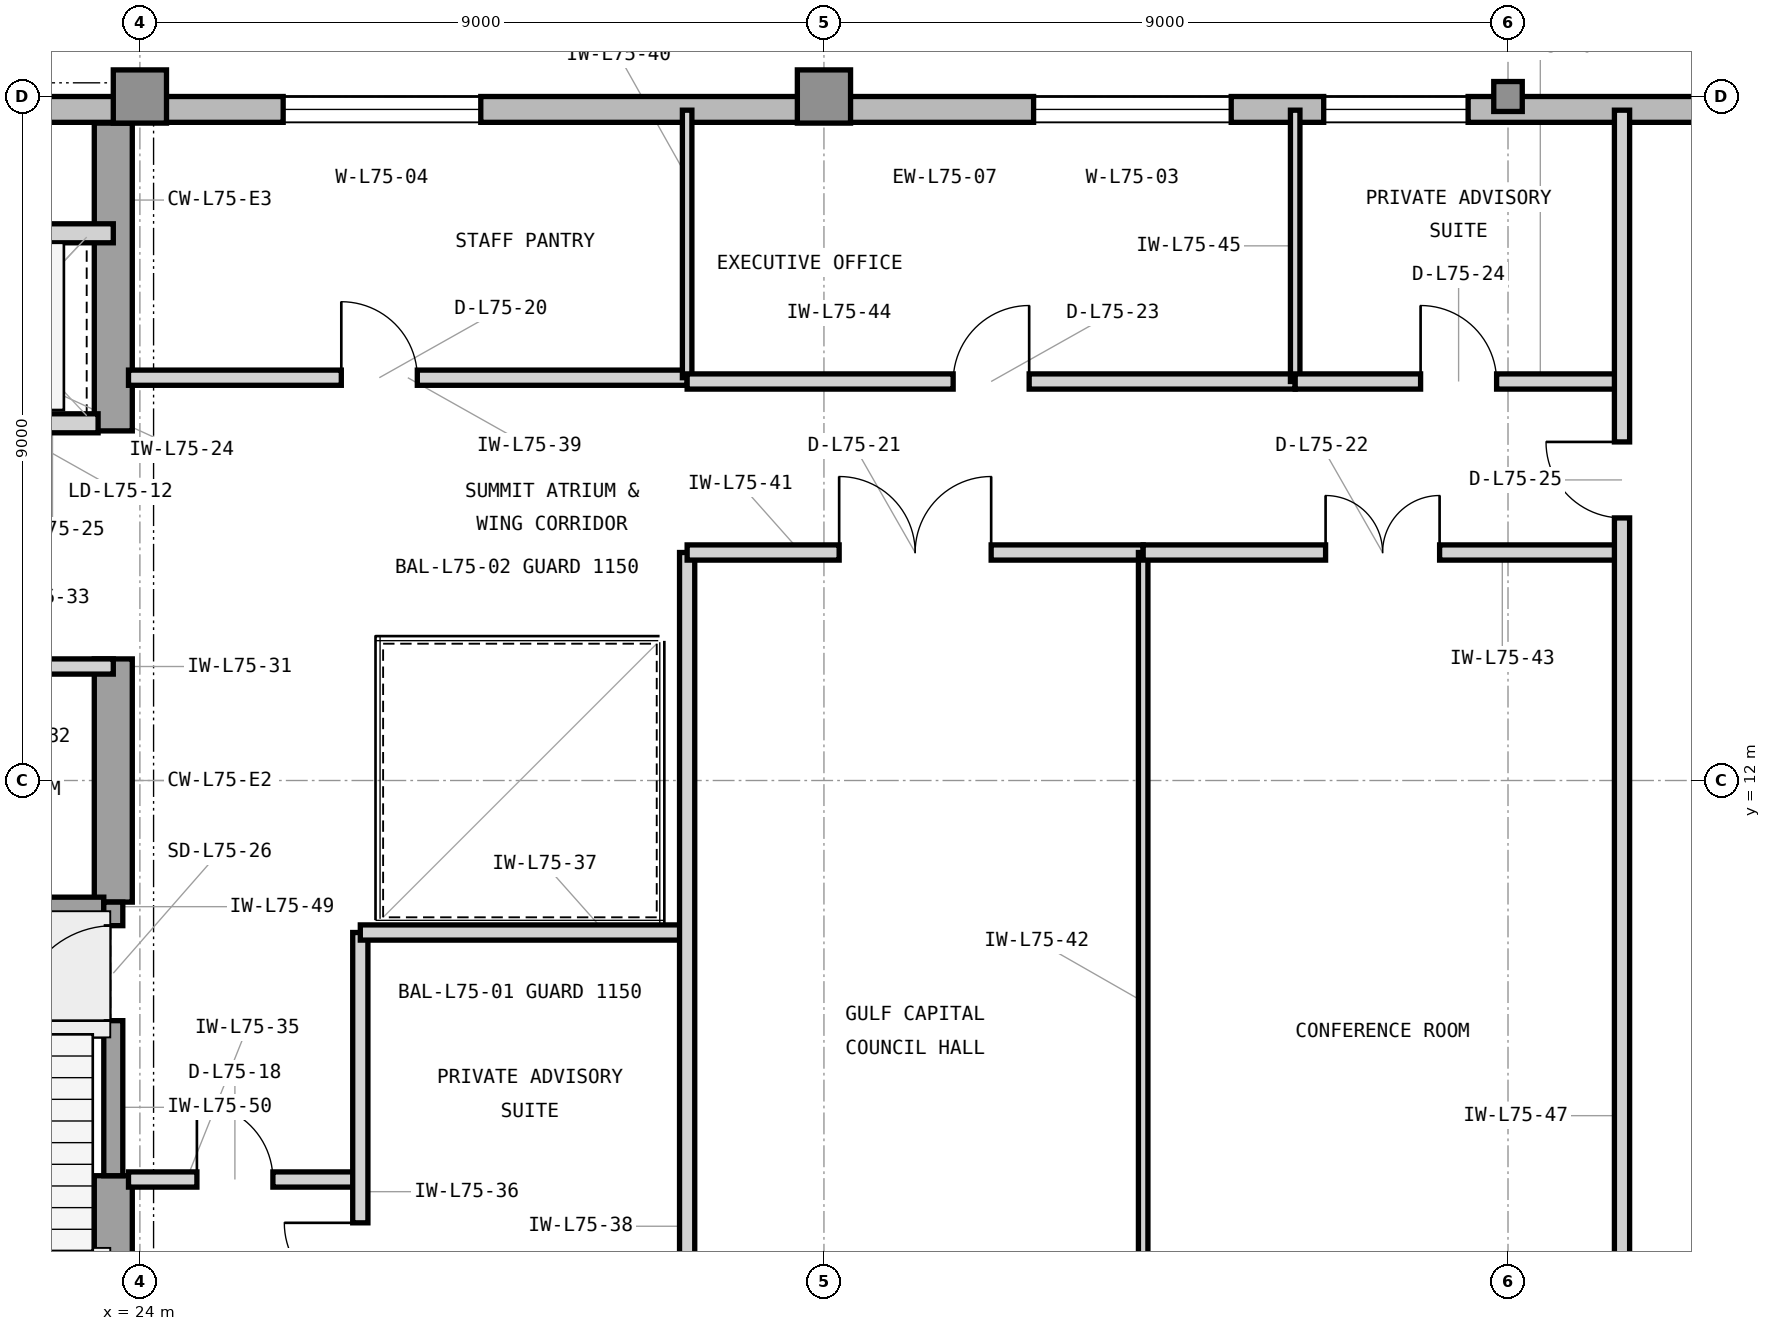
"""IFC4 building model, lengths in metres.
Left out: names, types, materials, properties, quantities, classifications, styles, units other than length and angle.
Written with IfcOpenShell. Run it as: python <this file> out.ifc"""

import sys

from ifc_helpers import new_model, si_unit, direction, frame, frame_2d, origin, origin_2d, place, context, subcontext, project, spatial, rectangle, i_section, extrude, element, fill, save


model = new_model("IFC4")
c1 = context("Model", 3, precision=1e-05, world=origin(), true_north=direction((0.0, 1.0)))
c2 = subcontext(c1, "Body", "Model", "MODEL_VIEW")
j1 = project(units=[si_unit("LENGTHUNIT", "METRE"), si_unit("PLANEANGLEUNIT", "RADIAN")], contexts=[c1])
p1 = place(None, origin())
s1 = spatial("IfcSite", under=j1, at=p1, CompositionType="ELEMENT")
p2 = place(p1, origin())
s2 = spatial("IfcBuilding", under=s1, at=p2, CompositionType="ELEMENT")
p3 = place(p2, frame((0.0, 0.0, 305.4)))
s3 = spatial("IfcBuildingStorey", under=s2, at=p3, CompositionType="ELEMENT", Elevation=305.4)
p4 = place(p3, frame((23.65, 3.6, 0.0), z_axis=(0.0, 0.0, 1.0), x_axis=(0.0, 1.0, 0.0)))
e1 = element("IfcWall", 1, at=p4, inside=s3, PredefinedType="SHEAR", context=c2, shape_type="SweptSolid", body=[
    extrude(rectangle(XDim=3.2, YDim=0.5, at=frame_2d((1.6, 0.0))), origin(), (0.0, 0.0, 1.0), 3.9),
])
p5 = place(p3, frame((23.65, 10.4, 0.0), z_axis=(0.0, 0.0, 1.0), x_axis=(0.0, 1.0, 0.0)))
e2 = element("IfcWall", 2, at=p5, inside=s3, PredefinedType="SHEAR", context=c2, shape_type="SweptSolid", body=[
    extrude(rectangle(XDim=3.2, YDim=0.5, at=frame_2d((1.6, 0.0))), origin(), (0.0, 0.0, 1.0), 3.9),
])
p6 = place(p3, frame((23.65, 16.6, 0.0), z_axis=(0.0, 0.0, 1.0), x_axis=(0.0, 1.0, 0.0)))
e3 = element("IfcWall", 3, at=p6, inside=s3, PredefinedType="SHEAR", context=c2, shape_type="SweptSolid", body=[
    extrude(rectangle(XDim=4.05, YDim=0.5, at=frame_2d((2.025, 0.0))), origin(), (0.0, 0.0, 1.0), 3.9),
])
for number, where, z_axis, x_axis in (
    (4, (24.0, 21.0, 0.0), (0.0, 0.0, 1.0), (1.0, 0.0, 0.0)),
    (5, (33.0, 21.0, 0.0), (0.0, 0.0, 1.0), (1.0, 0.0, 0.0)),
):
    element("IfcColumn", number, at=place(p3, frame(where, z_axis=z_axis, x_axis=x_axis)), inside=s3, PredefinedType="COLUMN", context=c2, shape_type="SweptSolid", body=[
        extrude(rectangle(XDim=0.7, YDim=0.7, at=origin_2d()), origin(), (0.0, 0.0, 1.0), 3.9),
    ])
p7 = place(p3, frame((42.0, 21.0, 0.0), z_axis=(0.0, 0.0, 1.0), x_axis=(1.0, 0.0, 0.0)))
e6 = element("IfcColumn", 6, at=p7, inside=s3, PredefinedType="COLUMN", context=c2, shape_type="SweptSolid", body=[
    extrude(i_section(OverallWidth=0.394, OverallDepth=0.375, WebThickness=0.017, FlangeThickness=0.028, FilletRadius=0.022, at=origin_2d()), origin(), (0.0, 0.0, 1.0), 3.9),
])
p8 = place(p3, frame((49.4, 20.83, 0.0), z_axis=(0.0, 0.0, 1.0), x_axis=(-1.0, 0.0, 0.0)))
e7 = element("IfcWall", 7, at=p8, inside=s3, PredefinedType="STANDARD", context=c2, shape_type="SweptSolid", body=[
    extrude(rectangle(XDim=29.62, YDim=0.34, at=frame_2d((14.81, 0.0))), origin(), (0.0, 0.0, 1.0), 3.715),
])
p9 = place(p8, frame((11.042, 0.0, 0.8)))
e8 = element("IfcOpeningElement", 8, at=p9, cuts=e7, PredefinedType="OPENING", context=c2, shape_type="SweptSolid", body=[
    extrude(rectangle(XDim=2.6, YDim=2.35, at=frame_2d((1.3, 1.175))), frame((0.0, 0.18, 0.0), z_axis=(0.0, -1.0, 0.0), x_axis=(1.0, 0.0, 0.0)), (0.0, 0.0, 1.0), 0.36),
])
p10 = place(p8, frame((20.915, 0.0, 0.8)))
e9 = element("IfcOpeningElement", 9, at=p10, cuts=e7, PredefinedType="OPENING", context=c2, shape_type="SweptSolid", body=[
    extrude(rectangle(XDim=2.6, YDim=2.35, at=frame_2d((1.3, 1.175))), frame((0.0, 0.18, 0.0), z_axis=(0.0, -1.0, 0.0), x_axis=(1.0, 0.0, 0.0)), (0.0, 0.0, 1.0), 0.36),
])
p11 = place(p8, frame((7.925, 0.0, 0.8)))
e10 = element("IfcOpeningElement", 10, at=p11, cuts=e7, PredefinedType="OPENING", context=c2, shape_type="SweptSolid", body=[
    extrude(rectangle(XDim=1.9, YDim=2.35, at=frame_2d((0.95, 1.175))), frame((0.0, 0.18, 0.0), z_axis=(0.0, -1.0, 0.0), x_axis=(1.0, 0.0, 0.0)), (0.0, 0.0, 1.0), 0.36),
])
p12 = place(p3, frame((21.05, 16.7, 0.0), z_axis=(0.0, 0.0, 1.0), x_axis=(1.0, 0.0, 0.0)))
e11 = element("IfcWall", 11, at=p12, inside=s3, PredefinedType="PARTITIONING", context=c2, shape_type="SweptSolid", body=[
    extrude(rectangle(XDim=2.4, YDim=0.25, at=frame_2d((1.2, 0.0))), origin(), (0.0, 0.0, 1.0), 3.354),
])
p13 = place(p12, frame((0.52, 0.0, 0.0)))
e12 = element("IfcOpeningElement", 12, at=p13, cuts=e11, PredefinedType="OPENING", context=c2, shape_type="SweptSolid", body=[
    extrude(rectangle(XDim=1.15, YDim=2.25, at=frame_2d((0.575, 1.125))), frame((0.0, 0.135, 0.0), z_axis=(0.0, -1.0, 0.0), x_axis=(1.0, 0.0, 0.0)), (0.0, 0.0, 1.0), 0.27),
])
p14 = place(p3, frame((16.45, 19.2, 0.0), z_axis=(0.0, 0.0, 1.0), x_axis=(1.0, 0.0, 0.0)))
e13 = element("IfcWall", 13, at=p14, inside=s3, PredefinedType="PARTITIONING", context=c2, shape_type="SweptSolid", body=[
    extrude(rectangle(XDim=7.2, YDim=0.25, at=frame_2d((3.6, 0.0))), origin(), (0.0, 0.0, 1.0), 3.705),
])
p15 = place(p3, frame((18.45, 13.5, 0.0), z_axis=(0.0, 0.0, 1.0), x_axis=(1.0, 0.0, 0.0)))
e14 = element("IfcWall", 14, at=p15, inside=s3, PredefinedType="PARTITIONING", context=c2, shape_type="SweptSolid", body=[
    extrude(rectangle(XDim=5.2, YDim=0.2, at=frame_2d((2.6, 0.0))), origin(), (0.0, 0.0, 1.0), 3.354),
])
p16 = place(p15, frame((2.125, 0.0, 0.0)))
e15 = element("IfcOpeningElement", 15, at=p16, cuts=e14, PredefinedType="OPENING", context=c2, shape_type="SweptSolid", body=[
    extrude(rectangle(XDim=0.95, YDim=2.1, at=frame_2d((0.475, 1.05))), frame((0.0, 0.11, 0.0), z_axis=(0.0, -1.0, 0.0), x_axis=(1.0, 0.0, 0.0)), (0.0, 0.0, 1.0), 0.22),
])
p17 = place(p3, frame((23.85, 6.75, 0.0), z_axis=(0.0, 0.0, 1.0), x_axis=(1.0, 0.0, 0.0)))
e16 = element("IfcWall", 16, at=p17, inside=s3, PredefinedType="PARTITIONING", context=c2, shape_type="SweptSolid", body=[
    extrude(rectangle(XDim=3.05, YDim=0.2, at=frame_2d((1.525, 0.0))), origin(), (0.0, 0.0, 1.0), 3.705),
])
p18 = place(p17, frame((0.9, 0.0, 0.0)))
e17 = element("IfcOpeningElement", 17, at=p18, cuts=e16, PredefinedType="OPENING", context=c2, shape_type="SweptSolid", body=[
    extrude(rectangle(XDim=1.0, YDim=2.15, at=frame_2d((0.5, 1.075))), frame((0.0, 0.11, 0.0), z_axis=(0.0, -1.0, 0.0), x_axis=(1.0, 0.0, 0.0)), (0.0, 0.0, 1.0), 0.22),
])
p19 = place(p3, frame((26.9, 3.18, 0.0), z_axis=(0.0, 0.0, 1.0), x_axis=(0.0, 1.0, 0.0)))
e18 = element("IfcWall", 18, at=p19, inside=s3, PredefinedType="PARTITIONING", context=c2, shape_type="SweptSolid", body=[
    extrude(rectangle(XDim=6.82, YDim=0.2, at=frame_2d((3.41, 0.0))), origin(), (0.0, 0.0, 1.0), 3.705),
])
p20 = place(p19, frame((2.0, 0.0, 0.0)))
e19 = element("IfcOpeningElement", 19, at=p20, cuts=e18, PredefinedType="OPENING", context=c2, shape_type="SweptSolid", body=[
    extrude(rectangle(XDim=1.0, YDim=2.15, at=frame_2d((0.5, 1.075))), frame((0.0, 0.11, 0.0), z_axis=(0.0, -1.0, 0.0), x_axis=(1.0, 0.0, 0.0)), (0.0, 0.0, 1.0), 0.22),
])
p21 = place(p3, frame((26.9, 10.0, 0.0), z_axis=(0.0, 0.0, 1.0), x_axis=(1.0, 0.0, 0.0)))
e20 = element("IfcWall", 20, at=p21, inside=s3, PredefinedType="PARTITIONING", context=c2, shape_type="SweptSolid", body=[
    extrude(rectangle(XDim=4.3, YDim=0.2, at=frame_2d((2.15, 0.0))), origin(), (0.0, 0.0, 1.0), 3.705),
])
p22 = place(p3, frame((31.2, 3.18, 0.0), z_axis=(0.0, 0.0, 1.0), x_axis=(0.0, 1.0, 0.0)))
e21 = element("IfcWall", 21, at=p22, inside=s3, PredefinedType="PARTITIONING", context=c2, shape_type="SweptSolid", body=[
    extrude(rectangle(XDim=11.82, YDim=0.2, at=frame_2d((5.91, 0.0))), origin(), (0.0, 0.0, 1.0), 3.705),
])
p23 = place(p3, frame((23.85, 17.3, 0.0), z_axis=(0.0, 0.0, 1.0), x_axis=(1.0, 0.0, 0.0)))
e22 = element("IfcWall", 22, at=p23, inside=s3, PredefinedType="PARTITIONING", context=c2, shape_type="SweptSolid", body=[
    extrude(rectangle(XDim=7.35, YDim=0.2, at=frame_2d((3.675, 0.0))), origin(), (0.0, 0.0, 1.0), 3.705),
])
p24 = place(p23, frame((2.8, 0.0, 0.0)))
e23 = element("IfcOpeningElement", 23, at=p24, cuts=e22, PredefinedType="OPENING", context=c2, shape_type="SweptSolid", body=[
    extrude(rectangle(XDim=1.0, YDim=2.15, at=frame_2d((0.5, 1.075))), frame((0.0, 0.11, 0.0), z_axis=(0.0, -1.0, 0.0), x_axis=(1.0, 0.0, 0.0)), (0.0, 0.0, 1.0), 0.22),
])
p25 = place(p3, frame((31.2, 17.3, 0.0), z_axis=(0.0, 0.0, 1.0), x_axis=(0.0, 1.0, 0.0)))
e24 = element("IfcWall", 24, at=p25, inside=s3, PredefinedType="PARTITIONING", context=c2, shape_type="SweptSolid", body=[
    extrude(rectangle(XDim=3.52, YDim=0.125, at=frame_2d((1.76, 0.0))), origin(), (0.0, 0.0, 1.0), 3.705),
])
p26 = place(p3, frame((31.2, 15.0, 0.0), z_axis=(0.0, 0.0, 1.0), x_axis=(1.0, 0.0, 0.0)))
e25 = element("IfcWall", 25, at=p26, inside=s3, PredefinedType="PARTITIONING", context=c2, shape_type="SweptSolid", body=[
    extrude(rectangle(XDim=6.0, YDim=0.2, at=frame_2d((3.0, 0.0))), origin(), (0.0, 0.0, 1.0), 3.354),
])
p27 = place(p26, frame((2.0, 0.0, 0.0)))
e26 = element("IfcOpeningElement", 26, at=p27, cuts=e25, PredefinedType="OPENING", context=c2, shape_type="SweptSolid", body=[
    extrude(rectangle(XDim=2.0, YDim=2.5, at=frame_2d((1.0, 1.25))), frame((0.0, 0.11, 0.0), z_axis=(0.0, -1.0, 0.0), x_axis=(1.0, 0.0, 0.0)), (0.0, 0.0, 1.0), 0.22),
])
p28 = place(p3, frame((37.2, 3.18, 0.0), z_axis=(0.0, 0.0, 1.0), x_axis=(0.0, 1.0, 0.0)))
e27 = element("IfcWall", 27, at=p28, inside=s3, PredefinedType="PARTITIONING", context=c2, shape_type="SweptSolid", body=[
    extrude(rectangle(XDim=11.82, YDim=0.125, at=frame_2d((5.91, 0.0))), origin(), (0.0, 0.0, 1.0), 3.705),
])
p29 = place(p3, frame((37.2, 15.0, 0.0), z_axis=(0.0, 0.0, 1.0), x_axis=(1.0, 0.0, 0.0)))
e28 = element("IfcWall", 28, at=p29, inside=s3, PredefinedType="PARTITIONING", context=c2, shape_type="SweptSolid", body=[
    extrude(rectangle(XDim=6.3, YDim=0.2, at=frame_2d((3.15, 0.0))), origin(), (0.0, 0.0, 1.0), 3.354),
])
p30 = place(p29, frame((2.4, 0.0, 0.0)))
e29 = element("IfcOpeningElement", 29, at=p30, cuts=e28, PredefinedType="OPENING", context=c2, shape_type="SweptSolid", body=[
    extrude(rectangle(XDim=1.5, YDim=2.3, at=frame_2d((0.75, 1.15))), frame((0.0, 0.11, 0.0), z_axis=(0.0, -1.0, 0.0), x_axis=(1.0, 0.0, 0.0)), (0.0, 0.0, 1.0), 0.22),
])
p31 = place(p3, frame((31.2, 17.25, 0.0), z_axis=(0.0, 0.0, 1.0), x_axis=(1.0, 0.0, 0.0)))
e30 = element("IfcWall", 30, at=p31, inside=s3, PredefinedType="PARTITIONING", context=c2, shape_type="SweptSolid", body=[
    extrude(rectangle(XDim=8.0, YDim=0.2, at=frame_2d((4.0, 0.0))), origin(), (0.0, 0.0, 1.0), 3.705),
])
p32 = place(p31, frame((3.5, 0.0, 0.0)))
e31 = element("IfcOpeningElement", 31, at=p32, cuts=e30, PredefinedType="OPENING", context=c2, shape_type="SweptSolid", body=[
    extrude(rectangle(XDim=1.0, YDim=2.15, at=frame_2d((0.5, 1.075))), frame((0.0, 0.11, 0.0), z_axis=(0.0, -1.0, 0.0), x_axis=(1.0, 0.0, 0.0)), (0.0, 0.0, 1.0), 0.22),
])
p33 = place(p3, frame((39.2, 17.25, 0.0), z_axis=(0.0, 0.0, 1.0), x_axis=(0.0, 1.0, 0.0)))
e32 = element("IfcWall", 32, at=p33, inside=s3, PredefinedType="PARTITIONING", context=c2, shape_type="SweptSolid", body=[
    extrude(rectangle(XDim=3.57, YDim=0.125, at=frame_2d((1.785, 0.0))), origin(), (0.0, 0.0, 1.0), 3.705),
])
p34 = place(p3, frame((39.2, 17.25, 0.0), z_axis=(0.0, 0.0, 1.0), x_axis=(1.0, 0.0, 0.0)))
e33 = element("IfcWall", 33, at=p34, inside=s3, PredefinedType="PARTITIONING", context=c2, shape_type="SweptSolid", body=[
    extrude(rectangle(XDim=4.3, YDim=0.2, at=frame_2d((2.15, 0.0))), origin(), (0.0, 0.0, 1.0), 3.705),
])
p35 = place(p34, frame((1.65, 0.0, 0.0)))
e34 = element("IfcOpeningElement", 34, at=p35, cuts=e33, PredefinedType="OPENING", context=c2, shape_type="SweptSolid", body=[
    extrude(rectangle(XDim=1.0, YDim=2.15, at=frame_2d((0.5, 1.075))), frame((0.0, 0.11, 0.0), z_axis=(0.0, -1.0, 0.0), x_axis=(1.0, 0.0, 0.0)), (0.0, 0.0, 1.0), 0.22),
])
p36 = place(p3, frame((43.5, 3.18, 0.0), z_axis=(0.0, 0.0, 1.0), x_axis=(0.0, 1.0, 0.0)))
e35 = element("IfcWall", 35, at=p36, inside=s3, PredefinedType="PARTITIONING", context=c2, shape_type="SweptSolid", body=[
    extrude(rectangle(XDim=17.64, YDim=0.2, at=frame_2d((8.82, 0.0))), origin(), (0.0, 0.0, 1.0), 3.705),
])
p37 = place(p36, frame((12.275, 0.0, 0.0)))
e36 = element("IfcOpeningElement", 36, at=p37, cuts=e35, PredefinedType="OPENING", context=c2, shape_type="SweptSolid", body=[
    extrude(rectangle(XDim=1.0, YDim=2.15, at=frame_2d((0.5, 1.075))), frame((0.0, 0.11, 0.0), z_axis=(0.0, -1.0, 0.0), x_axis=(1.0, 0.0, 0.0)), (0.0, 0.0, 1.0), 0.22),
])
p38 = place(p3, frame((19.705, 10.34, 0.0), z_axis=(0.0, 0.0, 1.0), x_axis=(1.0, 0.0, 0.0)))
e37 = element("IfcWall", 37, at=p38, inside=s3, PredefinedType="SHEAR", context=c2, shape_type="SweptSolid", body=[
    extrude(rectangle(XDim=3.82, YDim=0.25, at=frame_2d((1.91, 0.0))), origin(), (0.0, 0.0, 1.0), 3.9),
])
p39 = place(p3, frame((23.65, 6.8, 0.0), z_axis=(0.0, 0.0, 1.0), x_axis=(0.0, 1.0, 0.0)))
e38 = element("IfcWall", 38, at=p39, inside=s3, PredefinedType="SHEAR", context=c2, shape_type="SweptSolid", body=[
    extrude(rectangle(XDim=3.6, YDim=0.25, at=frame_2d((1.8, 0.0))), origin(), (0.0, 0.0, 1.0), 3.9),
])
p40 = place(p39, frame((2.04, 0.0, 0.0)))
e39 = element("IfcOpeningElement", 39, at=p40, cuts=e38, PredefinedType="OPENING", context=c2, shape_type="SweptSolid", body=[
    extrude(rectangle(XDim=1.25, YDim=2.2, at=frame_2d((0.625, 1.1))), frame((0.0, 0.135, 0.0), z_axis=(0.0, -1.0, 0.0), x_axis=(1.0, 0.0, 0.0)), (0.0, 0.0, 1.0), 0.27),
])
p41 = place(p9, origin())
e40 = element("IfcWindow", 40, at=p41, inside=s3, PartitioningType="SINGLE_PANEL", PredefinedType="WINDOW", context=c2, shape_type="SweptSolid", body=[
    extrude(rectangle(XDim=2.6, YDim=2.35, at=frame_2d((1.3, 1.175))), frame((0.0, 0.11, 0.0), z_axis=(0.0, -1.0, 0.0), x_axis=(1.0, 0.0, 0.0)), (0.0, 0.0, 1.0), 0.06),
])
fill(e8, e40)
p42 = place(p10, origin())
e41 = element("IfcWindow", 41, at=p42, inside=s3, PartitioningType="SINGLE_PANEL", PredefinedType="WINDOW", context=c2, shape_type="SweptSolid", body=[
    extrude(rectangle(XDim=2.6, YDim=2.35, at=frame_2d((1.3, 1.175))), frame((0.0, 0.11, 0.0), z_axis=(0.0, -1.0, 0.0), x_axis=(1.0, 0.0, 0.0)), (0.0, 0.0, 1.0), 0.06),
])
fill(e9, e41)
p43 = place(p18, origin())
e42 = element("IfcDoor", 42, at=p43, inside=s3, OperationType="SINGLE_SWING_LEFT", PredefinedType="DOOR", context=c2, shape_type="SweptSolid", body=[
    extrude(rectangle(XDim=1.0, YDim=2.15, at=frame_2d((0.5, 1.075))), frame((0.0, 0.025, 0.0), z_axis=(0.0, -1.0, 0.0), x_axis=(1.0, 0.0, 0.0)), (0.0, 0.0, 1.0), 0.05),
])
fill(e17, e42)
p44 = place(p20, origin())
e43 = element("IfcDoor", 43, at=p44, inside=s3, OperationType="SINGLE_SWING_RIGHT", PredefinedType="DOOR", context=c2, shape_type="SweptSolid", body=[
    extrude(rectangle(XDim=1.0, YDim=2.15, at=frame_2d((0.5, 1.075))), frame((0.0, 0.025, 0.0), z_axis=(0.0, -1.0, 0.0), x_axis=(1.0, 0.0, 0.0)), (0.0, 0.0, 1.0), 0.05),
])
fill(e19, e43)
p45 = place(p24, origin())
e44 = element("IfcDoor", 44, at=p45, inside=s3, OperationType="SINGLE_SWING_LEFT", PredefinedType="DOOR", context=c2, shape_type="SweptSolid", body=[
    extrude(rectangle(XDim=1.0, YDim=2.15, at=frame_2d((0.5, 1.075))), frame((0.0, 0.025, 0.0), z_axis=(0.0, -1.0, 0.0), x_axis=(1.0, 0.0, 0.0)), (0.0, 0.0, 1.0), 0.05),
])
fill(e23, e44)
p46 = place(p27, origin())
e45 = element("IfcDoor", 45, at=p46, inside=s3, OperationType="DOUBLE_DOOR_SINGLE_SWING", PredefinedType="DOOR", context=c2, shape_type="SweptSolid", body=[
    extrude(rectangle(XDim=2.0, YDim=2.5, at=frame_2d((1.0, 1.25))), frame((0.0, 0.025, 0.0), z_axis=(0.0, -1.0, 0.0), x_axis=(1.0, 0.0, 0.0)), (0.0, 0.0, 1.0), 0.05),
])
fill(e26, e45)
p47 = place(p30, origin())
e46 = element("IfcDoor", 46, at=p47, inside=s3, OperationType="DOUBLE_DOOR_SINGLE_SWING", PredefinedType="DOOR", context=c2, shape_type="SweptSolid", body=[
    extrude(rectangle(XDim=1.5, YDim=2.3, at=frame_2d((0.75, 1.15))), frame((0.0, 0.025, 0.0), z_axis=(0.0, -1.0, 0.0), x_axis=(1.0, 0.0, 0.0)), (0.0, 0.0, 1.0), 0.05),
])
fill(e29, e46)
p48 = place(p32, origin())
e47 = element("IfcDoor", 47, at=p48, inside=s3, OperationType="SINGLE_SWING_RIGHT", PredefinedType="DOOR", context=c2, shape_type="SweptSolid", body=[
    extrude(rectangle(XDim=1.0, YDim=2.15, at=frame_2d((0.5, 1.075))), frame((0.0, 0.025, 0.0), z_axis=(0.0, -1.0, 0.0), x_axis=(1.0, 0.0, 0.0)), (0.0, 0.0, 1.0), 0.05),
])
fill(e31, e47)
p49 = place(p35, origin())
e48 = element("IfcDoor", 48, at=p49, inside=s3, OperationType="SINGLE_SWING_LEFT", PredefinedType="DOOR", context=c2, shape_type="SweptSolid", body=[
    extrude(rectangle(XDim=1.0, YDim=2.15, at=frame_2d((0.5, 1.075))), frame((0.0, 0.025, 0.0), z_axis=(0.0, -1.0, 0.0), x_axis=(1.0, 0.0, 0.0)), (0.0, 0.0, 1.0), 0.05),
])
fill(e34, e48)
p50 = place(p37, origin())
e49 = element("IfcDoor", 49, at=p50, inside=s3, OperationType="SINGLE_SWING_RIGHT", PredefinedType="DOOR", context=c2, shape_type="SweptSolid", body=[
    extrude(rectangle(XDim=1.0, YDim=2.15, at=frame_2d((0.5, 1.075))), frame((0.0, 0.025, 0.0), z_axis=(0.0, -1.0, 0.0), x_axis=(1.0, 0.0, 0.0)), (0.0, 0.0, 1.0), 0.05),
])
fill(e36, e49)
p51 = place(p40, origin())
e50 = element("IfcDoor", 50, at=p51, inside=s3, OperationType="SINGLE_SWING_LEFT", PredefinedType="DOOR", context=c2, shape_type="SweptSolid", body=[
    extrude(rectangle(XDim=1.25, YDim=2.2, at=frame_2d((0.625, 1.1))), frame((0.0, 0.025, 0.0), z_axis=(0.0, -1.0, 0.0), x_axis=(1.0, 0.0, 0.0)), (0.0, 0.0, 1.0), 0.05),
])
fill(e39, e50)
p52 = place(p11, origin())
e51 = element("IfcWindow", 51, at=p52, inside=s3, PartitioningType="SINGLE_PANEL", PredefinedType="WINDOW", context=c2, shape_type="SweptSolid", body=[
    extrude(rectangle(XDim=1.9, YDim=2.35, at=frame_2d((0.95, 1.175))), frame((0.0, 0.11, 0.0), z_axis=(0.0, -1.0, 0.0), x_axis=(1.0, 0.0, 0.0)), (0.0, 0.0, 1.0), 0.06),
])
fill(e10, e51)
save(model, sys.argv[1])
